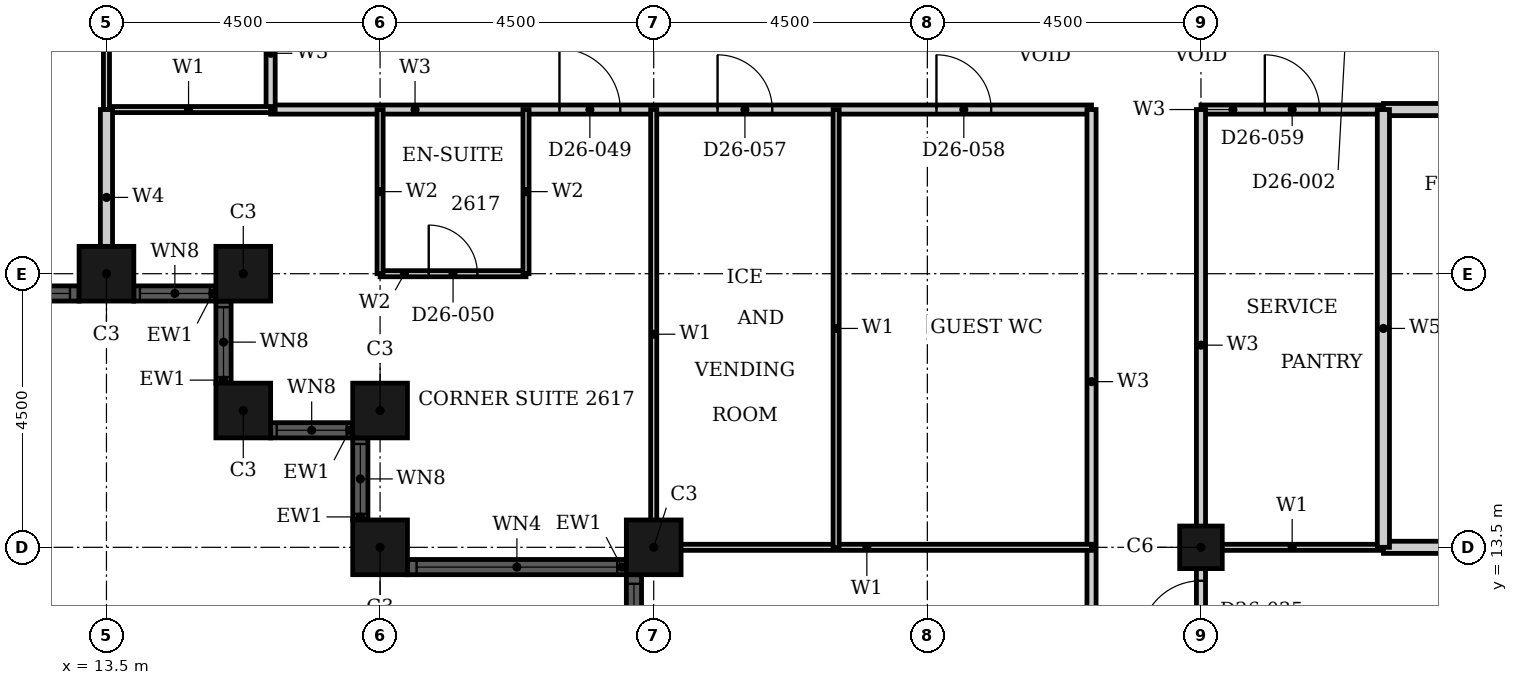
"""IFC4 building model, lengths in metres.
Left out: names, types, materials, properties, quantities, classifications, styles, units other than length and angle.
Written with IfcOpenShell. Run it as: python <this file> out.ifc"""

import sys

from ifc_helpers import new_model, si_unit, direction, frame, frame_2d, origin, origin_2d, place, context, subcontext, project, spatial, rectangle, hollow_rectangle, extrude, element, fill, save


model = new_model("IFC4")
c1 = context("Model", 3, precision=1e-05, world=origin(), true_north=direction((0.0, 1.0)))
c2 = subcontext(c1, "Body", "Model", "MODEL_VIEW")
j1 = project(units=[si_unit("LENGTHUNIT", "METRE"), si_unit("PLANEANGLEUNIT", "RADIAN")], contexts=[c1])
p1 = place(None, origin())
s1 = spatial("IfcSite", under=j1, at=p1, CompositionType="ELEMENT")
p2 = place(p1, origin())
s2 = spatial("IfcBuilding", under=s1, at=p2, CompositionType="ELEMENT")
p3 = place(p2, frame((0.0, 0.0, 108.0)))
s3 = spatial("IfcBuildingStorey", under=s2, at=p3, CompositionType="ELEMENT", Elevation=108.0)
for number, where, z_axis, x_axis in (
    (1, (13.5, 18.0, 0.0), (0.0, 0.0, 1.0), (1.0, 0.0, 0.0)),
    (2, (15.75, 18.0, 0.0), (0.0, 0.0, 1.0), (1.0, 0.0, 0.0)),
    (3, (15.75, 15.75, 0.0), (0.0, 0.0, 1.0), (1.0, 0.0, 0.0)),
    (4, (18.0, 15.75, 0.0), (0.0, 0.0, 1.0), (1.0, 0.0, 0.0)),
    (5, (18.0, 13.5, 0.0), (0.0, 0.0, 1.0), (1.0, 0.0, 0.0)),
    (6, (22.5, 13.5, 0.0), (0.0, 0.0, 1.0), (1.0, 0.0, 0.0)),
):
    element("IfcColumn", number, at=place(p3, frame(where, z_axis=z_axis, x_axis=x_axis)), inside=s3, PredefinedType="COLUMN", context=c2, shape_type="SweptSolid", body=[
        extrude(hollow_rectangle(XDim=0.9, YDim=0.9, WallThickness=0.028, at=origin_2d()), origin(), (0.0, 0.0, 1.0), 3.6),
    ])
p4 = place(p3, frame((31.5, 13.5, 0.0), z_axis=(0.0, 0.0, 1.0), x_axis=(1.0, 0.0, 0.0)))
e7 = element("IfcColumn", 7, at=p4, inside=s3, PredefinedType="COLUMN", context=c2, shape_type="SweptSolid", body=[
    extrude(hollow_rectangle(XDim=0.7, YDim=0.7, WallThickness=0.022, at=origin_2d()), origin(), (0.0, 0.0, 1.0), 3.6),
])
p5 = place(p3, frame((4.95, 17.675, 0.0), z_axis=(0.0, 0.0, 1.0), x_axis=(1.0, 0.0, 0.0)))
e8 = element("IfcWall", 8, at=p5, inside=s3, PredefinedType="SOLIDWALL", context=c2, shape_type="SweptSolid", body=[
    extrude(rectangle(XDim=8.1, YDim=0.25, at=frame_2d((4.05, 0.0))), origin(), (0.0, 0.0, 1.0), 3.6),
])
p6 = place(p5, frame((0.15, 0.0, 0.9)))
e9 = element("IfcOpeningElement", 9, at=p6, cuts=e8, PredefinedType="OPENING", context=c2, shape_type="SweptSolid", body=[
    extrude(rectangle(XDim=3.3, YDim=2.08, at=frame_2d((1.65, 1.04))), frame((0.0, 0.135, 0.0), z_axis=(0.0, -1.0, 0.0), x_axis=(1.0, 0.0, 0.0)), (0.0, 0.0, 1.0), 0.27),
])
p7 = place(p5, frame((4.65, 0.0, 0.9)))
e10 = element("IfcOpeningElement", 10, at=p7, cuts=e8, PredefinedType="OPENING", context=c2, shape_type="SweptSolid", body=[
    extrude(rectangle(XDim=3.3, YDim=2.08, at=frame_2d((1.65, 1.04))), frame((0.0, 0.135, 0.0), z_axis=(0.0, -1.0, 0.0), x_axis=(1.0, 0.0, 0.0)), (0.0, 0.0, 1.0), 0.27),
])
p8 = place(p3, frame((13.95, 17.675, 0.0), z_axis=(0.0, 0.0, 1.0), x_axis=(1.0, 0.0, 0.0)))
e11 = element("IfcWall", 11, at=p8, inside=s3, PredefinedType="SOLIDWALL", context=c2, shape_type="SweptSolid", body=[
    extrude(rectangle(XDim=1.35, YDim=0.25, at=frame_2d((0.675, 0.0))), origin(), (0.0, 0.0, 1.0), 3.6),
])
p9 = place(p8, frame((0.1, 0.0, 0.9)))
e12 = element("IfcOpeningElement", 12, at=p9, cuts=e11, PredefinedType="OPENING", context=c2, shape_type="SweptSolid", body=[
    extrude(rectangle(XDim=1.15, YDim=2.08, at=frame_2d((0.575, 1.04))), frame((0.0, 0.135, 0.0), z_axis=(0.0, -1.0, 0.0), x_axis=(1.0, 0.0, 0.0)), (0.0, 0.0, 1.0), 0.27),
])
p10 = place(p3, frame((15.425, 17.55, 0.0), z_axis=(0.0, 0.0, 1.0), x_axis=(0.0, -1.0, 0.0)))
e13 = element("IfcWall", 13, at=p10, inside=s3, PredefinedType="SOLIDWALL", context=c2, shape_type="SweptSolid", body=[
    extrude(rectangle(XDim=1.35, YDim=0.25, at=frame_2d((0.675, 0.0))), origin(), (0.0, 0.0, 1.0), 3.6),
])
p11 = place(p10, frame((0.1, 0.0, 0.9)))
e14 = element("IfcOpeningElement", 14, at=p11, cuts=e13, PredefinedType="OPENING", context=c2, shape_type="SweptSolid", body=[
    extrude(rectangle(XDim=1.15, YDim=2.08, at=frame_2d((0.575, 1.04))), frame((0.0, 0.135, 0.0), z_axis=(0.0, -1.0, 0.0), x_axis=(1.0, 0.0, 0.0)), (0.0, 0.0, 1.0), 0.27),
])
p12 = place(p3, frame((16.2, 15.425, 0.0), z_axis=(0.0, 0.0, 1.0), x_axis=(1.0, 0.0, 0.0)))
e15 = element("IfcWall", 15, at=p12, inside=s3, PredefinedType="SOLIDWALL", context=c2, shape_type="SweptSolid", body=[
    extrude(rectangle(XDim=1.35, YDim=0.25, at=frame_2d((0.675, 0.0))), origin(), (0.0, 0.0, 1.0), 3.6),
])
p13 = place(p12, frame((0.1, 0.0, 0.9)))
e16 = element("IfcOpeningElement", 16, at=p13, cuts=e15, PredefinedType="OPENING", context=c2, shape_type="SweptSolid", body=[
    extrude(rectangle(XDim=1.15, YDim=2.08, at=frame_2d((0.575, 1.04))), frame((0.0, 0.135, 0.0), z_axis=(0.0, -1.0, 0.0), x_axis=(1.0, 0.0, 0.0)), (0.0, 0.0, 1.0), 0.27),
])
p14 = place(p3, frame((17.675, 15.3, 0.0), z_axis=(0.0, 0.0, 1.0), x_axis=(0.0, -1.0, 0.0)))
e17 = element("IfcWall", 17, at=p14, inside=s3, PredefinedType="SOLIDWALL", context=c2, shape_type="SweptSolid", body=[
    extrude(rectangle(XDim=1.35, YDim=0.25, at=frame_2d((0.675, 0.0))), origin(), (0.0, 0.0, 1.0), 3.6),
])
p15 = place(p14, frame((0.1, 0.0, 0.9)))
e18 = element("IfcOpeningElement", 18, at=p15, cuts=e17, PredefinedType="OPENING", context=c2, shape_type="SweptSolid", body=[
    extrude(rectangle(XDim=1.15, YDim=2.08, at=frame_2d((0.575, 1.04))), frame((0.0, 0.135, 0.0), z_axis=(0.0, -1.0, 0.0), x_axis=(1.0, 0.0, 0.0)), (0.0, 0.0, 1.0), 0.27),
])
p16 = place(p3, frame((18.45, 13.175, 0.0), z_axis=(0.0, 0.0, 1.0), x_axis=(1.0, 0.0, 0.0)))
e19 = element("IfcWall", 19, at=p16, inside=s3, PredefinedType="SOLIDWALL", context=c2, shape_type="SweptSolid", body=[
    extrude(rectangle(XDim=3.6, YDim=0.25, at=frame_2d((1.8, 0.0))), origin(), (0.0, 0.0, 1.0), 3.6),
])
p17 = place(p16, frame((0.15, 0.0, 0.9)))
e20 = element("IfcOpeningElement", 20, at=p17, cuts=e19, PredefinedType="OPENING", context=c2, shape_type="SweptSolid", body=[
    extrude(rectangle(XDim=3.3, YDim=2.08, at=frame_2d((1.65, 1.04))), frame((0.0, 0.135, 0.0), z_axis=(0.0, -1.0, 0.0), x_axis=(1.0, 0.0, 0.0)), (0.0, 0.0, 1.0), 0.27),
])
p18 = place(p3, frame((22.175, 13.05, 0.0), z_axis=(0.0, 0.0, 1.0), x_axis=(0.0, -1.0, 0.0)))
e21 = element("IfcWall", 21, at=p18, inside=s3, PredefinedType="SOLIDWALL", context=c2, shape_type="SweptSolid", body=[
    extrude(rectangle(XDim=8.1, YDim=0.25, at=frame_2d((4.05, 0.0))), origin(), (0.0, 0.0, 1.0), 3.6),
])
p19 = place(p18, frame((0.15, 0.0, 0.9)))
e22 = element("IfcOpeningElement", 22, at=p19, cuts=e21, PredefinedType="OPENING", context=c2, shape_type="SweptSolid", body=[
    extrude(rectangle(XDim=3.3, YDim=2.08, at=frame_2d((1.65, 1.04))), frame((0.0, 0.135, 0.0), z_axis=(0.0, -1.0, 0.0), x_axis=(1.0, 0.0, 0.0)), (0.0, 0.0, 1.0), 0.27),
])
p20 = place(p18, frame((4.65, 0.0, 0.9)))
e23 = element("IfcOpeningElement", 23, at=p20, cuts=e21, PredefinedType="OPENING", context=c2, shape_type="SweptSolid", body=[
    extrude(rectangle(XDim=3.3, YDim=2.08, at=frame_2d((1.65, 1.04))), frame((0.0, 0.135, 0.0), z_axis=(0.0, -1.0, 0.0), x_axis=(1.0, 0.0, 0.0)), (0.0, 0.0, 1.0), 0.27),
])
p21 = place(p3, frame((16.2, 20.7, 0.0), z_axis=(0.0, 0.0, 1.0), x_axis=(1.0, 0.0, 0.0)))
e24 = element("IfcWall", 24, at=p21, inside=s3, PredefinedType="PARTITIONING", context=c2, shape_type="SweptSolid", body=[
    extrude(rectangle(XDim=13.5, YDim=0.15, at=frame_2d((6.75, 0.0))), origin(), (0.0, 0.0, 1.0), 3.3),
])
p22 = place(p21, frame((4.75, 0.0, 0.0)))
e25 = element("IfcOpeningElement", 25, at=p22, cuts=e24, PredefinedType="OPENING", context=c2, shape_type="SweptSolid", body=[
    extrude(rectangle(XDim=1.0, YDim=2.1, at=frame_2d((0.5, 1.05))), frame((0.0, 0.085, 0.0), z_axis=(0.0, -1.0, 0.0), x_axis=(1.0, 0.0, 0.0)), (0.0, 0.0, 1.0), 0.17),
])
p23 = place(p21, frame((7.35, 0.0, 0.0)))
e26 = element("IfcOpeningElement", 26, at=p23, cuts=e24, PredefinedType="OPENING", context=c2, shape_type="SweptSolid", body=[
    extrude(rectangle(XDim=0.9, YDim=2.1, at=frame_2d((0.45, 1.05))), frame((0.0, 0.085, 0.0), z_axis=(0.0, -1.0, 0.0), x_axis=(1.0, 0.0, 0.0)), (0.0, 0.0, 1.0), 0.17),
])
p24 = place(p21, frame((10.95, 0.0, 0.0)))
e27 = element("IfcOpeningElement", 27, at=p24, cuts=e24, PredefinedType="OPENING", context=c2, shape_type="SweptSolid", body=[
    extrude(rectangle(XDim=0.9, YDim=2.1, at=frame_2d((0.45, 1.05))), frame((0.0, 0.085, 0.0), z_axis=(0.0, -1.0, 0.0), x_axis=(1.0, 0.0, 0.0)), (0.0, 0.0, 1.0), 0.17),
])
p25 = place(p3, frame((31.5, 20.7, 0.0), z_axis=(0.0, 0.0, 1.0), x_axis=(1.0, 0.0, 0.0)))
e28 = element("IfcWall", 28, at=p25, inside=s3, PredefinedType="PARTITIONING", context=c2, shape_type="SweptSolid", body=[
    extrude(rectangle(XDim=3.0, YDim=0.15, at=frame_2d((1.5, 0.0))), origin(), (0.0, 0.0, 1.0), 3.3),
])
p26 = place(p25, frame((1.05, 0.0, 0.0)))
e29 = element("IfcOpeningElement", 29, at=p26, cuts=e28, PredefinedType="OPENING", context=c2, shape_type="SweptSolid", body=[
    extrude(rectangle(XDim=0.9, YDim=2.1, at=frame_2d((0.45, 1.05))), frame((0.0, 0.085, 0.0), z_axis=(0.0, -1.0, 0.0), x_axis=(1.0, 0.0, 0.0)), (0.0, 0.0, 1.0), 0.17),
])
p27 = place(p3, frame((16.2, 20.7, 0.0), z_axis=(0.0, 0.0, 1.0), x_axis=(0.0, 1.0, 0.0)))
e30 = element("IfcWall", 30, at=p27, inside=s3, PredefinedType="PARTITIONING", context=c2, shape_type="SweptSolid", body=[
    extrude(rectangle(XDim=4.5, YDim=0.15, at=frame_2d((2.25, 0.0))), origin(), (0.0, 0.0, 1.0), 3.3),
])
p28 = place(p27, frame((1.85, 0.0, 0.0)))
e31 = element("IfcOpeningElement", 31, at=p28, cuts=e30, PredefinedType="OPENING", context=c2, shape_type="SweptSolid", body=[
    extrude(rectangle(XDim=0.9, YDim=2.1, at=frame_2d((0.45, 1.05))), frame((0.0, 0.085, 0.0), z_axis=(0.0, -1.0, 0.0), x_axis=(1.0, 0.0, 0.0)), (0.0, 0.0, 1.0), 0.17),
])
p29 = place(p3, frame((29.7, 4.5, 0.0), z_axis=(0.0, 0.0, 1.0), x_axis=(0.0, 1.0, 0.0)))
e32 = element("IfcWall", 32, at=p29, inside=s3, PredefinedType="PARTITIONING", context=c2, shape_type="SweptSolid", body=[
    extrude(rectangle(XDim=16.2, YDim=0.15, at=frame_2d((8.1, 0.0))), origin(), (0.0, 0.0, 1.0), 3.3),
])
p30 = place(p29, frame((6.25, 0.0, 0.0)))
e33 = element("IfcOpeningElement", 33, at=p30, cuts=e32, PredefinedType="OPENING", context=c2, shape_type="SweptSolid", body=[
    extrude(rectangle(XDim=1.0, YDim=2.1, at=frame_2d((0.5, 1.05))), frame((0.0, 0.085, 0.0), z_axis=(0.0, -1.0, 0.0), x_axis=(1.0, 0.0, 0.0)), (0.0, 0.0, 1.0), 0.17),
])
p31 = place(p3, frame((31.5, 4.5, 0.0), z_axis=(0.0, 0.0, 1.0), x_axis=(0.0, 1.0, 0.0)))
e34 = element("IfcWall", 34, at=p31, inside=s3, PredefinedType="PARTITIONING", context=c2, shape_type="SweptSolid", body=[
    extrude(rectangle(XDim=16.2, YDim=0.15, at=frame_2d((8.1, 0.0))), origin(), (0.0, 0.0, 1.0), 2.58),
])
p32 = place(p31, frame((7.45, 0.0, 0.0)))
e35 = element("IfcOpeningElement", 35, at=p32, cuts=e34, PredefinedType="OPENING", context=c2, shape_type="SweptSolid", body=[
    extrude(rectangle(XDim=1.0, YDim=2.1, at=frame_2d((0.5, 1.05))), frame((0.0, 0.085, 0.0), z_axis=(0.0, -1.0, 0.0), x_axis=(1.0, 0.0, 0.0)), (0.0, 0.0, 1.0), 0.17),
])
p33 = place(p31, frame((2.95, 0.0, 0.0)))
e36 = element("IfcOpeningElement", 36, at=p33, cuts=e34, PredefinedType="OPENING", context=c2, shape_type="SweptSolid", body=[
    extrude(rectangle(XDim=1.0, YDim=2.1, at=frame_2d((0.5, 1.05))), frame((0.0, 0.085, 0.0), z_axis=(0.0, -1.0, 0.0), x_axis=(1.0, 0.0, 0.0)), (0.0, 0.0, 1.0), 0.17),
])
p34 = place(p3, frame((31.5, 13.5, 0.0), z_axis=(0.0, 0.0, 1.0), x_axis=(1.0, 0.0, 0.0)))
e37 = element("IfcWall", 37, at=p34, inside=s3, PredefinedType="PARTITIONING", context=c2, shape_type="SweptSolid", body=[
    extrude(rectangle(XDim=3.0, YDim=0.1, at=frame_2d((1.5, 0.0))), origin(), (0.0, 0.0, 1.0), 2.38),
])
p35 = place(p3, frame((22.31, 13.5, 0.0), z_axis=(0.0, 0.0, 1.0), x_axis=(1.0, 0.0, 0.0)))
e38 = element("IfcWall", 38, at=p35, inside=s3, PredefinedType="PARTITIONING", context=c2, shape_type="SweptSolid", body=[
    extrude(rectangle(XDim=7.39, YDim=0.1, at=frame_2d((3.695, 0.0))), origin(), (0.0, 0.0, 1.0), 2.38),
])
p36 = place(p3, frame((13.5, 20.7, 0.0), z_axis=(0.0, 0.0, 1.0), x_axis=(1.0, 0.0, 0.0)))
e39 = element("IfcWall", 39, at=p36, inside=s3, PredefinedType="PARTITIONING", context=c2, shape_type="SweptSolid", body=[
    extrude(rectangle(XDim=2.7, YDim=0.1, at=frame_2d((1.35, 0.0))), origin(), (0.0, 0.0, 1.0), 3.3),
])
p37 = place(p3, frame((13.5, 20.7, 0.0), z_axis=(0.0, 0.0, 1.0), x_axis=(0.0, 1.0, 0.0)))
e40 = element("IfcWall", 40, at=p37, inside=s3, PredefinedType="PARTITIONING", context=c2, shape_type="SweptSolid", body=[
    extrude(rectangle(XDim=4.5, YDim=0.1, at=frame_2d((2.25, 0.0))), origin(), (0.0, 0.0, 1.0), 2.38),
])
p38 = place(p3, frame((22.5, 13.31, 0.0), z_axis=(0.0, 0.0, 1.0), x_axis=(0.0, 1.0, 0.0)))
e41 = element("IfcWall", 41, at=p38, inside=s3, PredefinedType="PARTITIONING", context=c2, shape_type="SweptSolid", body=[
    extrude(rectangle(XDim=7.39, YDim=0.1, at=frame_2d((3.695, 0.0))), origin(), (0.0, 0.0, 1.0), 3.3),
])
p39 = place(p3, frame((25.5, 13.5, 0.0), z_axis=(0.0, 0.0, 1.0), x_axis=(0.0, 1.0, 0.0)))
e42 = element("IfcWall", 42, at=p39, inside=s3, PredefinedType="PARTITIONING", context=c2, shape_type="SweptSolid", body=[
    extrude(rectangle(XDim=7.2, YDim=0.1, at=frame_2d((3.6, 0.0))), origin(), (0.0, 0.0, 1.0), 3.3),
])
p40 = place(p3, frame((13.5, 17.81, 0.0), z_axis=(0.0, 0.0, 1.0), x_axis=(0.0, 1.0, 0.0)))
e43 = element("IfcWall", 43, at=p40, inside=s3, PredefinedType="PARTITIONING", context=c2, shape_type="SweptSolid", body=[
    extrude(rectangle(XDim=2.89, YDim=0.2, at=frame_2d((1.445, 0.0))), origin(), (0.0, 0.0, 1.0), 2.38),
])
p41 = place(p3, frame((18.0, 18.0, 0.0), z_axis=(0.0, 0.0, 1.0), x_axis=(1.0, 0.0, 0.0)))
e44 = element("IfcWall", 44, at=p41, inside=s3, PredefinedType="PARTITIONING", context=c2, shape_type="SweptSolid", body=[
    extrude(rectangle(XDim=2.4, YDim=0.1, at=frame_2d((1.2, 0.0))), origin(), (0.0, 0.0, 1.0), 3.3),
])
p42 = place(p41, frame((0.8, 0.0, 0.0)))
e45 = element("IfcOpeningElement", 45, at=p42, cuts=e44, PredefinedType="OPENING", context=c2, shape_type="SweptSolid", body=[
    extrude(rectangle(XDim=0.8, YDim=2.1, at=frame_2d((0.4, 1.05))), frame((0.0, 0.06, 0.0), z_axis=(0.0, -1.0, 0.0), x_axis=(1.0, 0.0, 0.0)), (0.0, 0.0, 1.0), 0.12),
])
for number, where, z_axis, x_axis in (
    (46, (18.0, 18.0, 0.0), (0.0, 0.0, 1.0), (0.0, 1.0, 0.0)),
    (47, (20.4, 18.0, 0.0), (0.0, 0.0, 1.0), (0.0, 1.0, 0.0)),
):
    element("IfcWall", number, at=place(p3, frame(where, z_axis=z_axis, x_axis=x_axis)), inside=s3, PredefinedType="PARTITIONING", context=c2, shape_type="SweptSolid", body=[
        extrude(rectangle(XDim=2.7, YDim=0.1, at=frame_2d((1.35, 0.0))), origin(), (0.0, 0.0, 1.0), 3.3),
    ])
p43 = place(p3, frame((34.5, 13.5, 0.0), z_axis=(0.0, 0.0, 1.0), x_axis=(1.0, 0.0, 0.0)))
e48 = element("IfcWall", 48, at=p43, inside=s3, PredefinedType="PARTITIONING", context=c2, shape_type="SweptSolid", body=[
    extrude(rectangle(XDim=6.19, YDim=0.2, at=frame_2d((3.095, 0.0))), origin(), (0.0, 0.0, 1.0), 2.38),
])
p44 = place(p3, frame((34.5, 20.7, 0.0), z_axis=(0.0, 0.0, 1.0), x_axis=(1.0, 0.0, 0.0)))
e49 = element("IfcWall", 49, at=p44, inside=s3, PredefinedType="PARTITIONING", context=c2, shape_type="SweptSolid", body=[
    extrude(rectangle(XDim=6.0, YDim=0.2, at=frame_2d((3.0, 0.0))), origin(), (0.0, 0.0, 1.0), 3.3),
])
p45 = place(p44, frame((2.55, 0.0, 0.0)))
e50 = element("IfcOpeningElement", 50, at=p45, cuts=e49, PredefinedType="OPENING", context=c2, shape_type="SweptSolid", body=[
    extrude(rectangle(XDim=0.9, YDim=2.1, at=frame_2d((0.45, 1.05))), frame((0.0, 0.11, 0.0), z_axis=(0.0, -1.0, 0.0), x_axis=(1.0, 0.0, 0.0)), (0.0, 0.0, 1.0), 0.22),
])
p46 = place(p3, frame((34.5, 13.5, 0.0), z_axis=(0.0, 0.0, 1.0), x_axis=(0.0, 1.0, 0.0)))
e51 = element("IfcWall", 51, at=p46, inside=s3, PredefinedType="PARTITIONING", context=c2, shape_type="SweptSolid", body=[
    extrude(rectangle(XDim=7.2, YDim=0.2, at=frame_2d((3.6, 0.0))), origin(), (0.0, 0.0, 1.0), 3.3),
])
p47 = place(p7, origin())
e52 = element("IfcWindow", 52, at=p47, inside=s3, PartitioningType="SINGLE_PANEL", PredefinedType="WINDOW", context=c2, shape_type="SweptSolid", body=[
    extrude(rectangle(XDim=3.3, YDim=2.08, at=frame_2d((1.65, 1.04))), frame((0.0, 0.03, 0.0), z_axis=(0.0, -1.0, 0.0), x_axis=(1.0, 0.0, 0.0)), (0.0, 0.0, 1.0), 0.06),
])
fill(e10, e52)
p48 = place(p9, origin())
e53 = element("IfcWindow", 53, at=p48, inside=s3, PartitioningType="SINGLE_PANEL", PredefinedType="WINDOW", context=c2, shape_type="SweptSolid", body=[
    extrude(rectangle(XDim=1.15, YDim=2.08, at=frame_2d((0.575, 1.04))), frame((0.0, 0.03, 0.0), z_axis=(0.0, -1.0, 0.0), x_axis=(1.0, 0.0, 0.0)), (0.0, 0.0, 1.0), 0.06),
])
fill(e12, e53)
p49 = place(p11, origin())
e54 = element("IfcWindow", 54, at=p49, inside=s3, PartitioningType="SINGLE_PANEL", PredefinedType="WINDOW", context=c2, shape_type="SweptSolid", body=[
    extrude(rectangle(XDim=1.15, YDim=2.08, at=frame_2d((0.575, 1.04))), frame((0.0, 0.03, 0.0), z_axis=(0.0, -1.0, 0.0), x_axis=(1.0, 0.0, 0.0)), (0.0, 0.0, 1.0), 0.06),
])
fill(e14, e54)
p50 = place(p13, origin())
e55 = element("IfcWindow", 55, at=p50, inside=s3, PartitioningType="SINGLE_PANEL", PredefinedType="WINDOW", context=c2, shape_type="SweptSolid", body=[
    extrude(rectangle(XDim=1.15, YDim=2.08, at=frame_2d((0.575, 1.04))), frame((0.0, 0.03, 0.0), z_axis=(0.0, -1.0, 0.0), x_axis=(1.0, 0.0, 0.0)), (0.0, 0.0, 1.0), 0.06),
])
fill(e16, e55)
p51 = place(p15, origin())
e56 = element("IfcWindow", 56, at=p51, inside=s3, PartitioningType="SINGLE_PANEL", PredefinedType="WINDOW", context=c2, shape_type="SweptSolid", body=[
    extrude(rectangle(XDim=1.15, YDim=2.08, at=frame_2d((0.575, 1.04))), frame((0.0, 0.03, 0.0), z_axis=(0.0, -1.0, 0.0), x_axis=(1.0, 0.0, 0.0)), (0.0, 0.0, 1.0), 0.06),
])
fill(e18, e56)
p52 = place(p17, origin())
e57 = element("IfcWindow", 57, at=p52, inside=s3, PartitioningType="SINGLE_PANEL", PredefinedType="WINDOW", context=c2, shape_type="SweptSolid", body=[
    extrude(rectangle(XDim=3.3, YDim=2.08, at=frame_2d((1.65, 1.04))), frame((0.0, 0.03, 0.0), z_axis=(0.0, -1.0, 0.0), x_axis=(1.0, 0.0, 0.0)), (0.0, 0.0, 1.0), 0.06),
])
fill(e20, e57)
p53 = place(p19, origin())
e58 = element("IfcWindow", 58, at=p53, inside=s3, PartitioningType="SINGLE_PANEL", PredefinedType="WINDOW", context=c2, shape_type="SweptSolid", body=[
    extrude(rectangle(XDim=3.3, YDim=2.08, at=frame_2d((1.65, 1.04))), frame((0.0, 0.03, 0.0), z_axis=(0.0, -1.0, 0.0), x_axis=(1.0, 0.0, 0.0)), (0.0, 0.0, 1.0), 0.06),
])
fill(e22, e58)
p54 = place(p32, origin())
e59 = element("IfcDoor", 59, at=p54, inside=s3, OperationType="SINGLE_SWING_RIGHT", PredefinedType="DOOR", context=c2, shape_type="SweptSolid", body=[
    extrude(rectangle(XDim=1.0, YDim=2.1, at=frame_2d((0.5, 1.05))), frame((0.0, 0.025, 0.0), z_axis=(0.0, -1.0, 0.0), x_axis=(1.0, 0.0, 0.0)), (0.0, 0.0, 1.0), 0.05),
])
fill(e35, e59)
p55 = place(p22, origin())
e60 = element("IfcDoor", 60, at=p55, inside=s3, OperationType="SINGLE_SWING_RIGHT", PredefinedType="DOOR", context=c2, shape_type="SweptSolid", body=[
    extrude(rectangle(XDim=1.0, YDim=2.1, at=frame_2d((0.5, 1.05))), frame((0.0, 0.025, 0.0), z_axis=(0.0, -1.0, 0.0), x_axis=(1.0, 0.0, 0.0)), (0.0, 0.0, 1.0), 0.05),
])
fill(e25, e60)
p56 = place(p42, origin())
e61 = element("IfcDoor", 61, at=p56, inside=s3, OperationType="SINGLE_SWING_LEFT", PredefinedType="DOOR", context=c2, shape_type="SweptSolid", body=[
    extrude(rectangle(XDim=0.8, YDim=2.1, at=frame_2d((0.4, 1.05))), frame((0.0, 0.025, 0.0), z_axis=(0.0, -1.0, 0.0), x_axis=(1.0, 0.0, 0.0)), (0.0, 0.0, 1.0), 0.05),
])
fill(e45, e61)
p57 = place(p23, origin())
e62 = element("IfcDoor", 62, at=p57, inside=s3, OperationType="SINGLE_SWING_LEFT", PredefinedType="DOOR", context=c2, shape_type="SweptSolid", body=[
    extrude(rectangle(XDim=0.9, YDim=2.1, at=frame_2d((0.45, 1.05))), frame((0.0, 0.025, 0.0), z_axis=(0.0, -1.0, 0.0), x_axis=(1.0, 0.0, 0.0)), (0.0, 0.0, 1.0), 0.05),
])
fill(e26, e62)
p58 = place(p24, origin())
e63 = element("IfcDoor", 63, at=p58, inside=s3, OperationType="SINGLE_SWING_LEFT", PredefinedType="DOOR", context=c2, shape_type="SweptSolid", body=[
    extrude(rectangle(XDim=0.9, YDim=2.1, at=frame_2d((0.45, 1.05))), frame((0.0, 0.025, 0.0), z_axis=(0.0, -1.0, 0.0), x_axis=(1.0, 0.0, 0.0)), (0.0, 0.0, 1.0), 0.05),
])
fill(e27, e63)
p59 = place(p26, origin())
e64 = element("IfcDoor", 64, at=p59, inside=s3, OperationType="SINGLE_SWING_LEFT", PredefinedType="DOOR", context=c2, shape_type="SweptSolid", body=[
    extrude(rectangle(XDim=0.9, YDim=2.1, at=frame_2d((0.45, 1.05))), frame((0.0, 0.025, 0.0), z_axis=(0.0, -1.0, 0.0), x_axis=(1.0, 0.0, 0.0)), (0.0, 0.0, 1.0), 0.05),
])
fill(e29, e64)
save(model, sys.argv[1])
